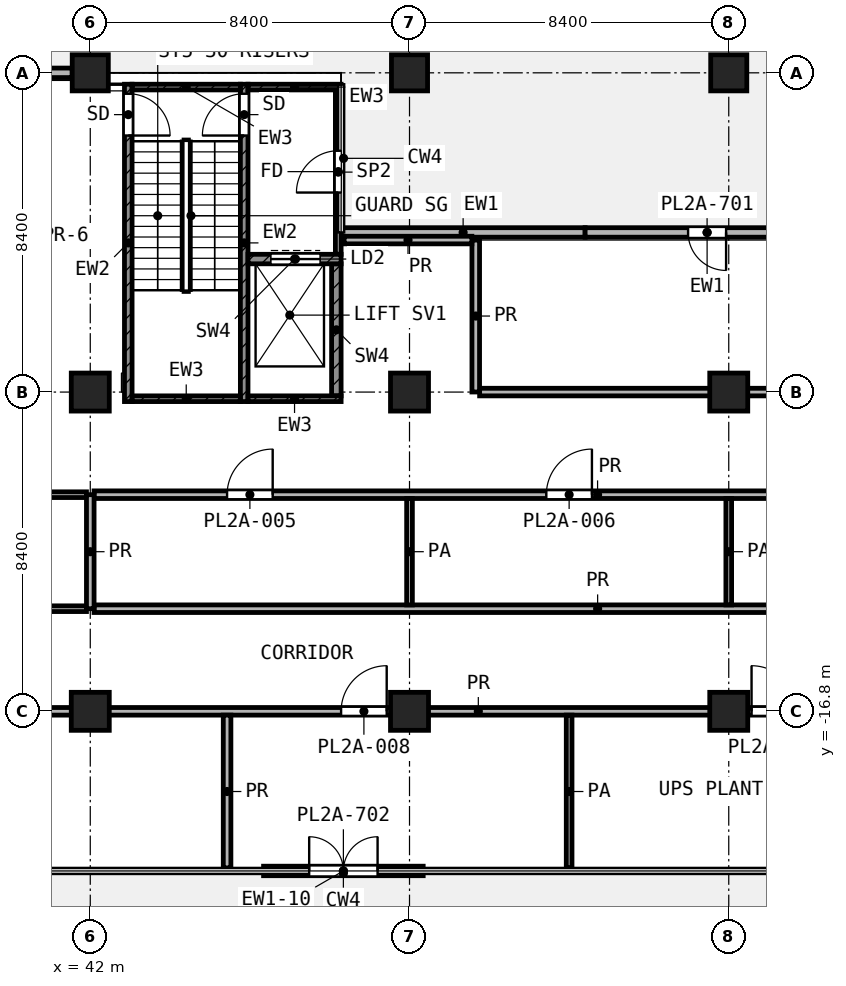
"""IFC4 building model, lengths in metres.
Left out: names, types, materials, properties, quantities, classifications, styles, units other than length and angle.
Written with IfcOpenShell. Run it as: python <this file> out.ifc"""

import sys

from ifc_helpers import new_model, si_unit, direction, frame, frame_2d, origin, origin_2d, place, context, subcontext, project, spatial, rectangle, extrude, element, fill, save


model = new_model("IFC4")
c1 = context("Model", 3, precision=1e-05, world=origin(), true_north=direction((0.0, 1.0)))
c2 = subcontext(c1, "Body", "Model", "MODEL_VIEW")
j1 = project(units=[si_unit("LENGTHUNIT", "METRE"), si_unit("PLANEANGLEUNIT", "RADIAN")], contexts=[c1])
p1 = place(None, origin())
s1 = spatial("IfcSite", under=j1, at=p1, CompositionType="ELEMENT")
p2 = place(p1, origin())
s2 = spatial("IfcBuilding", under=s1, at=p2, CompositionType="ELEMENT")
p3 = place(p2, frame((0.0, 0.0, 153.4)))
s3 = spatial("IfcBuildingStorey", under=s2, at=p3, CompositionType="ELEMENT", Elevation=153.4)
for number, where, z_axis, x_axis in (
    (1, (42.0, 0.0, 0.0), (0.0, 0.0, 1.0), (1.0, 0.0, 0.0)),
    (2, (50.4, 0.0, 0.0), (0.0, 0.0, 1.0), (1.0, 0.0, 0.0)),
    (3, (58.8, 0.0, 0.0), (0.0, 0.0, 1.0), (1.0, 0.0, 0.0)),
):
    element("IfcColumn", number, at=place(p3, frame(where, z_axis=z_axis, x_axis=x_axis)), inside=s3, PredefinedType="COLUMN", context=c2, shape_type="SweptSolid", body=[
        extrude(rectangle(XDim=0.95, YDim=0.95, at=origin_2d()), origin(), (0.0, 0.0, 1.0), 5.0),
    ])
for number, where, z_axis, x_axis in (
    (4, (42.0, -8.4, 0.0), (0.0, 0.0, 1.0), (1.0, 0.0, 0.0)),
    (5, (50.4, -8.4, 0.0), (0.0, 0.0, 1.0), (1.0, 0.0, 0.0)),
    (6, (58.8, -8.4, 0.0), (0.0, 0.0, 1.0), (1.0, 0.0, 0.0)),
    (7, (42.0, -16.8, 0.0), (0.0, 0.0, 1.0), (1.0, 0.0, 0.0)),
    (8, (50.4, -16.8, 0.0), (0.0, 0.0, 1.0), (1.0, 0.0, 0.0)),
    (9, (58.8, -16.8, 0.0), (0.0, 0.0, 1.0), (1.0, 0.0, 0.0)),
):
    element("IfcColumn", number, at=place(p3, frame(where, z_axis=z_axis, x_axis=x_axis)), inside=s3, PredefinedType="COLUMN", context=c2, shape_type="SweptSolid", body=[
        extrude(rectangle(XDim=1.0, YDim=1.0, at=origin_2d()), origin(), (0.0, 0.0, 1.0), 5.0),
    ])
p4 = place(p3, frame((46.56, -21.0, 0.0), z_axis=(0.0, 0.0, 1.0), x_axis=(1.0, 0.0, 0.0)))
e10 = element("IfcWall", 10, at=p4, inside=s3, PredefinedType="SOLIDWALL", context=c2, shape_type="SweptSolid", body=[
    extrude(rectangle(XDim=4.2, YDim=0.25, at=frame_2d((2.1, 0.0))), origin(), (0.0, 0.0, 1.0), 4.24),
])
p5 = place(p4, frame((1.2, 0.0, 0.0)))
e11 = element("IfcOpeningElement", 11, at=p5, cuts=e10, PredefinedType="OPENING", context=c2, shape_type="SweptSolid", body=[
    extrude(rectangle(XDim=1.8, YDim=2.1, at=frame_2d((0.9, 1.05))), frame((0.0, 0.135, 0.0), z_axis=(0.0, -1.0, 0.0), x_axis=(1.0, 0.0, 0.0)), (0.0, 0.0, 1.0), 0.27),
])
p6 = place(p3, frame((61.44, -4.2, 0.0), z_axis=(0.0, 0.0, 1.0), x_axis=(-1.0, 0.0, 0.0)))
e12 = element("IfcWall", 12, at=p6, inside=s3, PredefinedType="SOLIDWALL", context=c2, shape_type="SweptSolid", body=[
    extrude(rectangle(XDim=6.42, YDim=0.25, at=frame_2d((3.21, 0.0))), origin(), (0.0, 0.0, 1.0), 4.4),
])
p7 = place(p6, frame((2.71, 0.0, 0.0)))
e13 = element("IfcOpeningElement", 13, at=p7, cuts=e12, PredefinedType="OPENING", context=c2, shape_type="SweptSolid", body=[
    extrude(rectangle(XDim=1.0, YDim=2.1, at=frame_2d((0.5, 1.05))), frame((0.0, 0.135, 0.0), z_axis=(0.0, -1.0, 0.0), x_axis=(1.0, 0.0, 0.0)), (0.0, 0.0, 1.0), 0.27),
])
p8 = place(p3, frame((55.021, -4.2, 0.0), z_axis=(0.0, 0.0, 1.0), x_axis=(-1.0, 0.0, 0.0)))
e14 = element("IfcWall", 14, at=p8, inside=s3, PredefinedType="SOLIDWALL", context=c2, shape_type="SweptSolid", body=[
    extrude(rectangle(XDim=6.42, YDim=0.25, at=frame_2d((3.21, 0.0))), origin(), (0.0, 0.0, 1.0), 4.4),
])
p9 = place(p3, frame((41.525, 0.0, 0.0), z_axis=(0.0, 0.0, 1.0), x_axis=(-1.0, 0.0, 0.0)))
e15 = element("IfcWall", 15, at=p9, inside=s3, PredefinedType="SOLIDWALL", context=c2, shape_type="SweptSolid", body=[
    extrude(rectangle(XDim=7.45, YDim=0.25, at=frame_2d((3.725, 0.0))), origin(), (0.0, 0.0, 1.0), 3.1),
])
p10 = place(p9, frame((1.625, 0.0, 0.6)))
e16 = element("IfcOpeningElement", 16, at=p10, cuts=e15, PredefinedType="OPENING", context=c2, shape_type="SweptSolid", body=[
    extrude(rectangle(XDim=4.8, YDim=2.2, at=frame_2d((2.4, 1.1))), frame((0.0, 0.135, 0.0), z_axis=(0.0, -1.0, 0.0), x_axis=(1.0, 0.0, 0.0)), (0.0, 0.0, 1.0), 0.27),
])
p11 = place(p3, frame((43.0, -8.65, 0.0), z_axis=(0.0, 0.0, 1.0), x_axis=(0.0, 1.0, 0.0)))
e17 = element("IfcWall", 17, at=p11, inside=s3, PredefinedType="SHEAR", context=c2, shape_type="SweptSolid", body=[
    extrude(rectangle(XDim=8.35, YDim=0.2, at=frame_2d((4.175, 0.0))), origin(), (0.0, 0.0, 1.0), 4.4),
])
p12 = place(p11, frame((7.0, 0.0, 0.0)))
e18 = element("IfcOpeningElement", 18, at=p12, cuts=e17, PredefinedType="OPENING", context=c2, shape_type="SweptSolid", body=[
    extrude(rectangle(XDim=1.1, YDim=2.1, at=frame_2d((0.55, 1.05))), frame((0.0, 0.11, 0.0), z_axis=(0.0, -1.0, 0.0), x_axis=(1.0, 0.0, 0.0)), (0.0, 0.0, 1.0), 0.22),
])
p13 = place(p3, frame((46.05, -8.65, 0.0), z_axis=(0.0, 0.0, 1.0), x_axis=(0.0, 1.0, 0.0)))
e19 = element("IfcWall", 19, at=p13, inside=s3, PredefinedType="SHEAR", context=c2, shape_type="SweptSolid", body=[
    extrude(rectangle(XDim=8.35, YDim=0.2, at=frame_2d((4.175, 0.0))), origin(), (0.0, 0.0, 1.0), 4.4),
])
p14 = place(p13, frame((7.0, 0.0, 0.0)))
e20 = element("IfcOpeningElement", 20, at=p14, cuts=e19, PredefinedType="OPENING", context=c2, shape_type="SweptSolid", body=[
    extrude(rectangle(XDim=1.1, YDim=2.1, at=frame_2d((0.55, 1.05))), frame((0.0, 0.11, 0.0), z_axis=(0.0, -1.0, 0.0), x_axis=(1.0, 0.0, 0.0)), (0.0, 0.0, 1.0), 0.22),
])
p15 = place(p3, frame((43.1, -0.375, 0.0), z_axis=(0.0, 0.0, 1.0), x_axis=(1.0, 0.0, 0.0)))
e21 = element("IfcWall", 21, at=p15, inside=s3, PredefinedType="SHEAR", context=c2, shape_type="SweptSolid", body=[
    extrude(rectangle(XDim=2.85, YDim=0.15, at=frame_2d((1.425, 0.0))), origin(), (0.0, 0.0, 1.0), 4.4),
])
p16 = place(p3, frame((46.15, -0.375, 0.0), z_axis=(0.0, 0.0, 1.0), x_axis=(1.0, 0.0, 0.0)))
e22 = element("IfcWall", 22, at=p16, inside=s3, PredefinedType="SHEAR", context=c2, shape_type="SweptSolid", body=[
    extrude(rectangle(XDim=2.45, YDim=0.15, at=frame_2d((1.225, 0.0))), origin(), (0.0, 0.0, 1.0), 4.4),
])
p17 = place(p3, frame((43.1, -8.575, 0.0), z_axis=(0.0, 0.0, 1.0), x_axis=(1.0, 0.0, 0.0)))
e23 = element("IfcWall", 23, at=p17, inside=s3, PredefinedType="SHEAR", context=c2, shape_type="SweptSolid", body=[
    extrude(rectangle(XDim=2.85, YDim=0.15, at=frame_2d((1.425, 0.0))), origin(), (0.0, 0.0, 1.0), 4.4),
])
p18 = place(p3, frame((46.15, -8.575, 0.0), z_axis=(0.0, 0.0, 1.0), x_axis=(1.0, 0.0, 0.0)))
e24 = element("IfcWall", 24, at=p18, inside=s3, PredefinedType="SHEAR", context=c2, shape_type="SweptSolid", body=[
    extrude(rectangle(XDim=2.45, YDim=0.15, at=frame_2d((1.225, 0.0))), origin(), (0.0, 0.0, 1.0), 4.4),
])
p19 = place(p3, frame((46.15, -4.9, 0.0), z_axis=(0.0, 0.0, 1.0), x_axis=(1.0, 0.0, 0.0)))
e25 = element("IfcWall", 25, at=p19, inside=s3, PredefinedType="SHEAR", context=c2, shape_type="SweptSolid", body=[
    extrude(rectangle(XDim=2.45, YDim=0.25, at=frame_2d((1.225, 0.0))), origin(), (0.0, 0.0, 1.0), 4.4),
])
p20 = place(p19, frame((0.6, 0.0, 0.0)))
e26 = element("IfcOpeningElement", 26, at=p20, cuts=e25, PredefinedType="OPENING", context=c2, shape_type="SweptSolid", body=[
    extrude(rectangle(XDim=1.3, YDim=2.1, at=frame_2d((0.65, 1.05))), frame((0.0, 0.135, 0.0), z_axis=(0.0, -1.0, 0.0), x_axis=(1.0, 0.0, 0.0)), (0.0, 0.0, 1.0), 0.27),
])
p21 = place(p3, frame((48.475, -8.5, 0.0), z_axis=(0.0, 0.0, 1.0), x_axis=(0.0, 1.0, 0.0)))
e27 = element("IfcWall", 27, at=p21, inside=s3, PredefinedType="SHEAR", context=c2, shape_type="SweptSolid", body=[
    extrude(rectangle(XDim=3.475, YDim=0.25, at=frame_2d((1.738, 0.0))), origin(), (0.0, 0.0, 1.0), 4.4),
])
p22 = place(p3, frame((48.525, -4.775, 0.0), z_axis=(0.0, 0.0, 1.0), x_axis=(0.0, 1.0, 0.0)))
e28 = element("IfcWall", 28, at=p22, inside=s3, PredefinedType="PARTITIONING", context=c2, shape_type="SweptSolid", body=[
    extrude(rectangle(XDim=4.325, YDim=0.15, at=frame_2d((2.163, 0.0))), origin(), (0.0, 0.0, 1.0), 4.4),
])
p23 = place(p22, frame((1.625, 0.0, 0.0)))
e29 = element("IfcOpeningElement", 29, at=p23, cuts=e28, PredefinedType="OPENING", context=c2, shape_type="SweptSolid", body=[
    extrude(rectangle(XDim=1.1, YDim=2.1, at=frame_2d((0.55, 1.05))), frame((0.0, 0.085, 0.0), z_axis=(0.0, -1.0, 0.0), x_axis=(1.0, 0.0, 0.0)), (0.0, 0.0, 1.0), 0.17),
])
p24 = place(p3, frame((29.475, -14.1, 0.0), z_axis=(0.0, 0.0, 1.0), x_axis=(1.0, 0.0, 0.0)))
e30 = element("IfcWall", 30, at=p24, inside=s3, PredefinedType="PARTITIONING", context=c2, shape_type="SweptSolid", body=[
    extrude(rectangle(XDim=12.425, YDim=0.15, at=frame_2d((6.212, 0.0))), origin(), (0.0, 0.0, 1.0), 4.4),
])
p25 = place(p3, frame((29.478, -11.1, 0.0), z_axis=(0.0, 0.0, 1.0), x_axis=(1.0, 0.0, 0.0)))
e31 = element("IfcWall", 31, at=p25, inside=s3, PredefinedType="PARTITIONING", context=c2, shape_type="SweptSolid", body=[
    extrude(rectangle(XDim=12.422, YDim=0.15, at=frame_2d((6.211, 0.0))), origin(), (0.0, 0.0, 1.0), 4.4),
])
p26 = place(p25, frame((5.723, 0.0, 0.0)))
e32 = element("IfcOpeningElement", 32, at=p26, cuts=e31, PredefinedType="OPENING", context=c2, shape_type="SweptSolid", body=[
    extrude(rectangle(XDim=1.0, YDim=2.1, at=frame_2d((0.5, 1.05))), frame((0.0, 0.085, 0.0), z_axis=(0.0, -1.0, 0.0), x_axis=(1.0, 0.0, 0.0)), (0.0, 0.0, 1.0), 0.17),
])
p27 = place(p3, frame((50.4, -14.0, 0.0), z_axis=(0.0, 0.0, 1.0), x_axis=(0.0, 1.0, 0.0)))
e33 = element("IfcWall", 33, at=p27, inside=s3, PredefinedType="PARTITIONING", context=c2, shape_type="SweptSolid", body=[
    extrude(rectangle(XDim=2.8, YDim=0.15, at=frame_2d((1.4, 0.0))), origin(), (0.0, 0.0, 1.0), 4.4),
])
p28 = place(p3, frame((54.6, -20.92, 0.0), z_axis=(0.0, 0.0, 1.0), x_axis=(0.0, 1.0, 0.0)))
e34 = element("IfcWall", 34, at=p28, inside=s3, PredefinedType="PARTITIONING", context=c2, shape_type="SweptSolid", body=[
    extrude(rectangle(XDim=4.02, YDim=0.15, at=frame_2d((2.01, 0.0))), origin(), (0.0, 0.0, 1.0), 4.4),
])
p29 = place(p3, frame((58.8, -14.0, 0.0), z_axis=(0.0, 0.0, 1.0), x_axis=(0.0, 1.0, 0.0)))
e35 = element("IfcWall", 35, at=p29, inside=s3, PredefinedType="PARTITIONING", context=c2, shape_type="SweptSolid", body=[
    extrude(rectangle(XDim=2.8, YDim=0.15, at=frame_2d((1.4, 0.0))), origin(), (0.0, 0.0, 1.0), 4.4),
])
p30 = place(p3, frame((33.1, -16.8, 0.0), z_axis=(0.0, 0.0, 1.0), x_axis=(1.0, 0.0, 0.0)))
e36 = element("IfcWall", 36, at=p30, inside=s3, PredefinedType="PARTITIONING", context=c2, shape_type="SweptSolid", body=[
    extrude(rectangle(XDim=38.221, YDim=0.2, at=frame_2d((19.11, 0.0))), origin(), (0.0, 0.0, 1.0), 4.4),
])
p31 = place(p30, frame((3.8, 0.0, 0.0)))
e37 = element("IfcOpeningElement", 37, at=p31, cuts=e36, PredefinedType="OPENING", context=c2, shape_type="SweptSolid", body=[
    extrude(rectangle(XDim=1.2, YDim=2.1, at=frame_2d((0.6, 1.05))), frame((0.0, 0.11, 0.0), z_axis=(0.0, -1.0, 0.0), x_axis=(1.0, 0.0, 0.0)), (0.0, 0.0, 1.0), 0.22),
])
p32 = place(p30, frame((15.5, 0.0, 0.0)))
e38 = element("IfcOpeningElement", 38, at=p32, cuts=e36, PredefinedType="OPENING", context=c2, shape_type="SweptSolid", body=[
    extrude(rectangle(XDim=1.2, YDim=2.1, at=frame_2d((0.6, 1.05))), frame((0.0, 0.11, 0.0), z_axis=(0.0, -1.0, 0.0), x_axis=(1.0, 0.0, 0.0)), (0.0, 0.0, 1.0), 0.22),
])
p33 = place(p30, frame((26.3, 0.0, 0.0)))
e39 = element("IfcOpeningElement", 39, at=p33, cuts=e36, PredefinedType="OPENING", context=c2, shape_type="SweptSolid", body=[
    extrude(rectangle(XDim=1.2, YDim=2.1, at=frame_2d((0.6, 1.05))), frame((0.0, 0.11, 0.0), z_axis=(0.0, -1.0, 0.0), x_axis=(1.0, 0.0, 0.0)), (0.0, 0.0, 1.0), 0.22),
])
p34 = place(p30, frame((34.701, 0.0, 0.0)))
e40 = element("IfcOpeningElement", 40, at=p34, cuts=e36, PredefinedType="OPENING", context=c2, shape_type="SweptSolid", body=[
    extrude(rectangle(XDim=1.2, YDim=2.1, at=frame_2d((0.6, 1.05))), frame((0.0, 0.11, 0.0), z_axis=(0.0, -1.0, 0.0), x_axis=(1.0, 0.0, 0.0)), (0.0, 0.0, 1.0), 0.22),
])
p35 = place(p3, frame((42.1, -14.1, 0.0), z_axis=(0.0, 0.0, 1.0), x_axis=(1.0, 0.0, 0.0)))
e41 = element("IfcWall", 41, at=p35, inside=s3, PredefinedType="PARTITIONING", context=c2, shape_type="SweptSolid", body=[
    extrude(rectangle(XDim=26.5, YDim=0.2, at=frame_2d((13.25, 0.0))), origin(), (0.0, 0.0, 1.0), 4.4),
])
p36 = place(p3, frame((42.1, -11.1, 0.0), z_axis=(0.0, 0.0, 1.0), x_axis=(1.0, 0.0, 0.0)))
e42 = element("IfcWall", 42, at=p36, inside=s3, PredefinedType="PARTITIONING", context=c2, shape_type="SweptSolid", body=[
    extrude(rectangle(XDim=26.497, YDim=0.2, at=frame_2d((13.249, 0.0))), origin(), (0.0, 0.0, 1.0), 4.4),
])
p37 = place(p36, frame((3.5, 0.0, 0.0)))
e43 = element("IfcOpeningElement", 43, at=p37, cuts=e42, PredefinedType="OPENING", context=c2, shape_type="SweptSolid", body=[
    extrude(rectangle(XDim=1.2, YDim=2.1, at=frame_2d((0.6, 1.05))), frame((0.0, 0.11, 0.0), z_axis=(0.0, -1.0, 0.0), x_axis=(1.0, 0.0, 0.0)), (0.0, 0.0, 1.0), 0.22),
])
p38 = place(p36, frame((11.9, 0.0, 0.0)))
e44 = element("IfcOpeningElement", 44, at=p38, cuts=e42, PredefinedType="OPENING", context=c2, shape_type="SweptSolid", body=[
    extrude(rectangle(XDim=1.2, YDim=2.1, at=frame_2d((0.6, 1.05))), frame((0.0, 0.11, 0.0), z_axis=(0.0, -1.0, 0.0), x_axis=(1.0, 0.0, 0.0)), (0.0, 0.0, 1.0), 0.22),
])
p39 = place(p36, frame((21.048, 0.0, 0.0)))
e45 = element("IfcOpeningElement", 45, at=p39, cuts=e42, PredefinedType="OPENING", context=c2, shape_type="SweptSolid", body=[
    extrude(rectangle(XDim=1.2, YDim=2.1, at=frame_2d((0.6, 1.05))), frame((0.0, 0.11, 0.0), z_axis=(0.0, -1.0, 0.0), x_axis=(1.0, 0.0, 0.0)), (0.0, 0.0, 1.0), 0.22),
])
p40 = place(p3, frame((52.245, -8.4, 0.0), z_axis=(0.0, 0.0, 1.0), x_axis=(1.0, 0.0, 0.0)))
e46 = element("IfcWall", 46, at=p40, inside=s3, PredefinedType="PARTITIONING", context=c2, shape_type="SweptSolid", body=[
    extrude(rectangle(XDim=19.076, YDim=0.2, at=frame_2d((9.538, 0.0))), origin(), (0.0, 0.0, 1.0), 4.4),
])
p41 = place(p40, frame((8.928, 0.0, 0.0)))
e47 = element("IfcOpeningElement", 47, at=p41, cuts=e46, PredefinedType="OPENING", context=c2, shape_type="SweptSolid", body=[
    extrude(rectangle(XDim=1.2, YDim=2.1, at=frame_2d((0.6, 1.05))), frame((0.0, 0.11, 0.0), z_axis=(0.0, -1.0, 0.0), x_axis=(1.0, 0.0, 0.0)), (0.0, 0.0, 1.0), 0.22),
])
p42 = place(p3, frame((48.68, -4.4, 0.0), z_axis=(0.0, 0.0, 1.0), x_axis=(1.0, 0.0, 0.0)))
e48 = element("IfcWall", 48, at=p42, inside=s3, PredefinedType="PARTITIONING", context=c2, shape_type="SweptSolid", body=[
    extrude(rectangle(XDim=3.361, YDim=0.2, at=frame_2d((1.681, 0.0))), origin(), (0.0, 0.0, 1.0), 4.4),
])
p43 = place(p3, frame((42.0, -14.1, 0.0), z_axis=(0.0, 0.0, 1.0), x_axis=(0.0, 1.0, 0.0)))
e49 = element("IfcWall", 49, at=p43, inside=s3, PredefinedType="PARTITIONING", context=c2, shape_type="SweptSolid", body=[
    extrude(rectangle(XDim=3.0, YDim=0.2, at=frame_2d((1.5, 0.0))), origin(), (0.0, 0.0, 1.0), 4.4),
])
p44 = place(p3, frame((45.6, -20.92, 0.0), z_axis=(0.0, 0.0, 1.0), x_axis=(0.0, 1.0, 0.0)))
e50 = element("IfcWall", 50, at=p44, inside=s3, PredefinedType="PARTITIONING", context=c2, shape_type="SweptSolid", body=[
    extrude(rectangle(XDim=4.02, YDim=0.2, at=frame_2d((2.01, 0.0))), origin(), (0.0, 0.0, 1.0), 4.4),
])
p45 = place(p3, frame((52.143, -8.398, 0.0), z_axis=(0.0, 0.0, 1.0), x_axis=(0.0, 1.0, 0.0)))
e51 = element("IfcWall", 51, at=p45, inside=s3, PredefinedType="PARTITIONING", context=c2, shape_type="SweptSolid", body=[
    extrude(rectangle(XDim=3.997, YDim=0.2, at=frame_2d((1.999, 0.0))), origin(), (0.0, 0.0, 1.0), 4.4),
])
p46 = place(p5, origin())
e52 = element("IfcDoor", 52, at=p46, inside=s3, OperationType="DOUBLE_DOOR_SINGLE_SWING", PredefinedType="DOOR", context=c2, shape_type="SweptSolid", body=[
    extrude(rectangle(XDim=1.8, YDim=2.1, at=frame_2d((0.9, 1.05))), frame((0.0, 0.025, 0.0), z_axis=(0.0, -1.0, 0.0), x_axis=(1.0, 0.0, 0.0)), (0.0, 0.0, 1.0), 0.05),
])
fill(e11, e52)
p47 = place(p7, origin())
e53 = element("IfcDoor", 53, at=p47, inside=s3, OperationType="SINGLE_SWING_LEFT", PredefinedType="DOOR", context=c2, shape_type="SweptSolid", body=[
    extrude(rectangle(XDim=1.0, YDim=2.1, at=frame_2d((0.5, 1.05))), frame((0.0, 0.025, 0.0), z_axis=(0.0, -1.0, 0.0), x_axis=(1.0, 0.0, 0.0)), (0.0, 0.0, 1.0), 0.05),
])
fill(e13, e53)
p48 = place(p12, frame((1.1, 0.0, 0.0), z_axis=(0.0, 0.0, 1.0), x_axis=(-1.0, 0.0, 0.0)))
e54 = element("IfcDoor", 54, at=p48, inside=s3, OperationType="SINGLE_SWING_LEFT", PredefinedType="DOOR", context=c2, shape_type="SweptSolid", body=[
    extrude(rectangle(XDim=1.1, YDim=2.1, at=frame_2d((0.55, 1.05))), frame((0.0, 0.025, 0.0), z_axis=(0.0, -1.0, 0.0), x_axis=(1.0, 0.0, 0.0)), (0.0, 0.0, 1.0), 0.05),
])
fill(e18, e54)
p49 = place(p14, origin())
e55 = element("IfcDoor", 55, at=p49, inside=s3, OperationType="SINGLE_SWING_LEFT", PredefinedType="DOOR", context=c2, shape_type="SweptSolid", body=[
    extrude(rectangle(XDim=1.1, YDim=2.1, at=frame_2d((0.55, 1.05))), frame((0.0, 0.025, 0.0), z_axis=(0.0, -1.0, 0.0), x_axis=(1.0, 0.0, 0.0)), (0.0, 0.0, 1.0), 0.05),
])
fill(e20, e55)
p50 = place(p20, origin())
e56 = element("IfcDoor", 56, at=p50, inside=s3, OperationType="DOUBLE_DOOR_SLIDING", PredefinedType="DOOR", context=c2, shape_type="SweptSolid", body=[
    extrude(rectangle(XDim=1.3, YDim=2.1, at=frame_2d((0.65, 1.05))), frame((0.0, 0.025, 0.0), z_axis=(0.0, -1.0, 0.0), x_axis=(1.0, 0.0, 0.0)), (0.0, 0.0, 1.0), 0.05),
])
fill(e26, e56)
p51 = place(p23, origin())
e57 = element("IfcDoor", 57, at=p51, inside=s3, OperationType="SINGLE_SWING_LEFT", PredefinedType="DOOR", context=c2, shape_type="SweptSolid", body=[
    extrude(rectangle(XDim=1.1, YDim=2.1, at=frame_2d((0.55, 1.05))), frame((0.0, 0.025, 0.0), z_axis=(0.0, -1.0, 0.0), x_axis=(1.0, 0.0, 0.0)), (0.0, 0.0, 1.0), 0.05),
])
fill(e29, e57)
p52 = place(p37, origin())
e58 = element("IfcDoor", 58, at=p52, inside=s3, OperationType="SINGLE_SWING_RIGHT", PredefinedType="DOOR", context=c2, shape_type="SweptSolid", body=[
    extrude(rectangle(XDim=1.2, YDim=2.1, at=frame_2d((0.6, 1.05))), frame((0.0, 0.025, 0.0), z_axis=(0.0, -1.0, 0.0), x_axis=(1.0, 0.0, 0.0)), (0.0, 0.0, 1.0), 0.05),
])
fill(e43, e58)
p53 = place(p38, origin())
e59 = element("IfcDoor", 59, at=p53, inside=s3, OperationType="SINGLE_SWING_RIGHT", PredefinedType="DOOR", context=c2, shape_type="SweptSolid", body=[
    extrude(rectangle(XDim=1.2, YDim=2.1, at=frame_2d((0.6, 1.05))), frame((0.0, 0.025, 0.0), z_axis=(0.0, -1.0, 0.0), x_axis=(1.0, 0.0, 0.0)), (0.0, 0.0, 1.0), 0.05),
])
fill(e44, e59)
p54 = place(p32, origin())
e60 = element("IfcDoor", 60, at=p54, inside=s3, OperationType="SINGLE_SWING_RIGHT", PredefinedType="DOOR", context=c2, shape_type="SweptSolid", body=[
    extrude(rectangle(XDim=1.2, YDim=2.1, at=frame_2d((0.6, 1.05))), frame((0.0, 0.025, 0.0), z_axis=(0.0, -1.0, 0.0), x_axis=(1.0, 0.0, 0.0)), (0.0, 0.0, 1.0), 0.05),
])
fill(e38, e60)
p55 = place(p33, origin())
e61 = element("IfcDoor", 61, at=p55, inside=s3, OperationType="SINGLE_SWING_LEFT", PredefinedType="DOOR", context=c2, shape_type="SweptSolid", body=[
    extrude(rectangle(XDim=1.2, YDim=2.1, at=frame_2d((0.6, 1.05))), frame((0.0, 0.025, 0.0), z_axis=(0.0, -1.0, 0.0), x_axis=(1.0, 0.0, 0.0)), (0.0, 0.0, 1.0), 0.05),
])
fill(e39, e61)
save(model, sys.argv[1])
